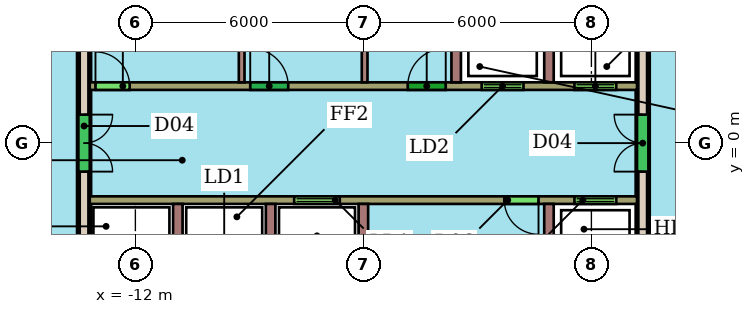
"""IFC4 building model, lengths in metres.
Left out: names, types, materials, properties, quantities, classifications, styles, units other than length and angle.
Written with IfcOpenShell. Run it as: python <this file> out.ifc"""

import sys

from ifc_helpers import new_model, si_unit, direction, frame, frame_2d, origin, place, context, subcontext, project, spatial, rectangle, extrude, element, fill, save


model = new_model("IFC4")
c1 = context("Model", 3, precision=1e-05, world=origin(), true_north=direction((0.0, 1.0)))
c2 = subcontext(c1, "Body", "Model", "MODEL_VIEW")
j1 = project(units=[si_unit("LENGTHUNIT", "METRE"), si_unit("PLANEANGLEUNIT", "RADIAN")], contexts=[c1])
p1 = place(None, origin())
s1 = spatial("IfcSite", under=j1, at=p1, CompositionType="ELEMENT")
p2 = place(p1, origin())
s2 = spatial("IfcBuilding", under=s1, at=p2, CompositionType="ELEMENT")
p3 = place(p2, frame((0.0, 0.0, 286.5)))
s3 = spatial("IfcBuildingStorey", under=s2, at=p3, CompositionType="ELEMENT", Elevation=286.5)
p4 = place(p3, frame((-13.35, 7.3, 0.0), z_axis=(0.0, 0.0, 1.0), x_axis=(0.0, -1.0, 0.0)))
e1 = element("IfcWall", 1, at=p4, inside=s3, PredefinedType="SHEAR", context=c2, shape_type="SweptSolid", body=[
    extrude(rectangle(XDim=14.6, YDim=0.3, at=frame_2d((7.3, 0.0))), origin(), (0.0, 0.0, 1.0), 3.3),
])
p5 = place(p4, frame((6.55, 0.0, 0.0)))
e2 = element("IfcOpeningElement", 2, at=p5, cuts=e1, PredefinedType="OPENING", context=c2, shape_type="SweptSolid", body=[
    extrude(rectangle(XDim=1.5, YDim=2.1, at=frame_2d((0.75, 1.05))), frame((0.0, 0.16, 0.0), z_axis=(0.0, -1.0, 0.0), x_axis=(1.0, 0.0, 0.0)), (0.0, 0.0, 1.0), 0.32),
])
p6 = place(p3, frame((1.35, -7.3, 0.0), z_axis=(0.0, 0.0, 1.0), x_axis=(0.0, 1.0, 0.0)))
e3 = element("IfcWall", 3, at=p6, inside=s3, PredefinedType="SHEAR", context=c2, shape_type="SweptSolid", body=[
    extrude(rectangle(XDim=14.6, YDim=0.3, at=frame_2d((7.3, 0.0))), origin(), (0.0, 0.0, 1.0), 3.3),
])
p7 = place(p6, frame((1.21, 0.0, 0.0)))
e4 = element("IfcOpeningElement", 4, at=p7, cuts=e3, PredefinedType="OPENING", context=c2, shape_type="SweptSolid", body=[
    extrude(rectangle(XDim=1.0, YDim=2.1, at=frame_2d((0.5, 1.05))), frame((0.0, 0.16, 0.0), z_axis=(0.0, -1.0, 0.0), x_axis=(1.0, 0.0, 0.0)), (0.0, 0.0, 1.0), 0.32),
])
p8 = place(p6, frame((6.55, 0.0, 0.0)))
e5 = element("IfcOpeningElement", 5, at=p8, cuts=e3, PredefinedType="OPENING", context=c2, shape_type="SweptSolid", body=[
    extrude(rectangle(XDim=1.5, YDim=2.1, at=frame_2d((0.75, 1.05))), frame((0.0, 0.16, 0.0), z_axis=(0.0, -1.0, 0.0), x_axis=(1.0, 0.0, 0.0)), (0.0, 0.0, 1.0), 0.32),
])
p9 = place(p3, frame((-13.2, 1.5, 0.0), z_axis=(0.0, 0.0, 1.0), x_axis=(1.0, 0.0, 0.0)))
e6 = element("IfcWall", 6, at=p9, inside=s3, PredefinedType="SHEAR", context=c2, shape_type="SweptSolid", body=[
    extrude(rectangle(XDim=14.4, YDim=0.2, at=frame_2d((7.2, 0.0))), origin(), (0.0, 0.0, 1.0), 3.3),
])
p10 = place(p9, frame((10.312, 0.0, 0.0)))
e7 = element("IfcOpeningElement", 7, at=p10, cuts=e6, PredefinedType="OPENING", context=c2, shape_type="SweptSolid", body=[
    extrude(rectangle(XDim=1.1, YDim=2.1, at=frame_2d((0.55, 1.05))), frame((0.0, 0.11, 0.0), z_axis=(0.0, -1.0, 0.0), x_axis=(1.0, 0.0, 0.0)), (0.0, 0.0, 1.0), 0.22),
])
p11 = place(p9, frame((12.754, 0.0, 0.0)))
e8 = element("IfcOpeningElement", 8, at=p11, cuts=e6, PredefinedType="OPENING", context=c2, shape_type="SweptSolid", body=[
    extrude(rectangle(XDim=1.1, YDim=2.1, at=frame_2d((0.55, 1.05))), frame((0.0, 0.11, 0.0), z_axis=(0.0, -1.0, 0.0), x_axis=(1.0, 0.0, 0.0)), (0.0, 0.0, 1.0), 0.22),
])
p12 = place(p9, frame((0.15, 0.0, 0.0)))
e9 = element("IfcOpeningElement", 9, at=p12, cuts=e6, PredefinedType="OPENING", context=c2, shape_type="SweptSolid", body=[
    extrude(rectangle(XDim=0.9, YDim=2.1, at=frame_2d((0.45, 1.05))), frame((0.0, 0.11, 0.0), z_axis=(0.0, -1.0, 0.0), x_axis=(1.0, 0.0, 0.0)), (0.0, 0.0, 1.0), 0.22),
])
p13 = place(p9, frame((4.222, 0.0, 0.0)))
e10 = element("IfcOpeningElement", 10, at=p13, cuts=e6, PredefinedType="OPENING", context=c2, shape_type="SweptSolid", body=[
    extrude(rectangle(XDim=1.0, YDim=2.1, at=frame_2d((0.5, 1.05))), frame((0.0, 0.11, 0.0), z_axis=(0.0, -1.0, 0.0), x_axis=(1.0, 0.0, 0.0)), (0.0, 0.0, 1.0), 0.22),
])
p14 = place(p9, frame((8.367, 0.0, 0.0)))
e11 = element("IfcOpeningElement", 11, at=p14, cuts=e6, PredefinedType="OPENING", context=c2, shape_type="SweptSolid", body=[
    extrude(rectangle(XDim=1.0, YDim=2.1, at=frame_2d((0.5, 1.05))), frame((0.0, 0.11, 0.0), z_axis=(0.0, -1.0, 0.0), x_axis=(1.0, 0.0, 0.0)), (0.0, 0.0, 1.0), 0.22),
])
p15 = place(p3, frame((1.2, -1.5, 0.0), z_axis=(0.0, 0.0, 1.0), x_axis=(-1.0, 0.0, 0.0)))
e12 = element("IfcWall", 12, at=p15, inside=s3, PredefinedType="SHEAR", context=c2, shape_type="SweptSolid", body=[
    extrude(rectangle(XDim=14.4, YDim=0.2, at=frame_2d((7.2, 0.0))), origin(), (0.0, 0.0, 1.0), 3.3),
])
p16 = place(p15, frame((7.821, 0.0, 0.0)))
e13 = element("IfcOpeningElement", 13, at=p16, cuts=e12, PredefinedType="OPENING", context=c2, shape_type="SweptSolid", body=[
    extrude(rectangle(XDim=1.2, YDim=2.1, at=frame_2d((0.6, 1.05))), frame((0.0, 0.11, 0.0), z_axis=(0.0, -1.0, 0.0), x_axis=(1.0, 0.0, 0.0)), (0.0, 0.0, 1.0), 0.22),
])
p17 = place(p15, frame((0.546, 0.0, 0.0)))
e14 = element("IfcOpeningElement", 14, at=p17, cuts=e12, PredefinedType="OPENING", context=c2, shape_type="SweptSolid", body=[
    extrude(rectangle(XDim=1.1, YDim=2.1, at=frame_2d((0.55, 1.05))), frame((0.0, 0.11, 0.0), z_axis=(0.0, -1.0, 0.0), x_axis=(1.0, 0.0, 0.0)), (0.0, 0.0, 1.0), 0.22),
])
p18 = place(p15, frame((2.592, 0.0, 0.0)))
e15 = element("IfcOpeningElement", 15, at=p18, cuts=e12, PredefinedType="OPENING", context=c2, shape_type="SweptSolid", body=[
    extrude(rectangle(XDim=0.9, YDim=2.1, at=frame_2d((0.45, 1.05))), frame((0.0, 0.11, 0.0), z_axis=(0.0, -1.0, 0.0), x_axis=(1.0, 0.0, 0.0)), (0.0, 0.0, 1.0), 0.22),
])
for number, where, z_axis, x_axis in (
    (16, (-3.558, 1.6, 0.0), (0.0, 0.0, 1.0), (0.0, 1.0, 0.0)),
    (17, (-1.117, 1.6, 0.0), (0.0, 0.0, 1.0), (0.0, 1.0, 0.0)),
):
    element("IfcWall", number, at=place(p3, frame(where, z_axis=z_axis, x_axis=x_axis)), inside=s3, PredefinedType="SHEAR", context=c2, shape_type="SweptSolid", body=[
        extrude(rectangle(XDim=1.93, YDim=0.25, at=frame_2d((0.965, 0.0))), origin(), (0.0, 0.0, 1.0), 3.3),
    ])
for number, where, z_axis, x_axis in (
    (18, (-9.203, 1.6, 0.0), (0.0, 0.0, 1.0), (0.0, 1.0, 0.0)),
    (19, (-5.967, 1.6, 0.0), (0.0, 0.0, 1.0), (0.0, 1.0, 0.0)),
):
    element("IfcWall", number, at=place(p3, frame(where, z_axis=z_axis, x_axis=x_axis)), inside=s3, PredefinedType="PARTITIONING", context=c2, shape_type="SweptSolid", body=[
        extrude(rectangle(XDim=1.93, YDim=0.15, at=frame_2d((0.965, 0.0))), origin(), (0.0, 0.0, 1.0), 3.3),
    ])
for number, where, z_axis, x_axis in (
    (20, (-10.883, -1.6, 0.0), (0.0, 0.0, 1.0), (0.0, -1.0, 0.0)),
    (21, (-8.442, -1.6, 0.0), (0.0, 0.0, 1.0), (0.0, -1.0, 0.0)),
    (22, (-6.0, -1.6, 0.0), (0.0, 0.0, 1.0), (0.0, -1.0, 0.0)),
    (23, (-1.117, -1.6, 0.0), (0.0, 0.0, 1.0), (0.0, -1.0, 0.0)),
):
    element("IfcWall", number, at=place(p3, frame(where, z_axis=z_axis, x_axis=x_axis)), inside=s3, PredefinedType="SHEAR", context=c2, shape_type="SweptSolid", body=[
        extrude(rectangle(XDim=1.93, YDim=0.25, at=frame_2d((0.965, 0.0))), origin(), (0.0, 0.0, 1.0), 3.3),
    ])
p19 = place(p5, origin())
e24 = element("IfcDoor", 24, at=p19, inside=s3, OperationType="DOUBLE_DOOR_SINGLE_SWING", PredefinedType="NOTDEFINED", context=c2, shape_type="SweptSolid", body=[
    extrude(rectangle(XDim=1.5, YDim=2.1, at=frame_2d((0.75, 1.05))), frame((0.0, 0.025, 0.0), z_axis=(0.0, -1.0, 0.0), x_axis=(1.0, 0.0, 0.0)), (0.0, 0.0, 1.0), 0.05),
])
fill(e2, e24)
p20 = place(p8, origin())
e25 = element("IfcDoor", 25, at=p20, inside=s3, OperationType="DOUBLE_DOOR_SINGLE_SWING", PredefinedType="NOTDEFINED", context=c2, shape_type="SweptSolid", body=[
    extrude(rectangle(XDim=1.5, YDim=2.1, at=frame_2d((0.75, 1.05))), frame((0.0, 0.025, 0.0), z_axis=(0.0, -1.0, 0.0), x_axis=(1.0, 0.0, 0.0)), (0.0, 0.0, 1.0), 0.05),
])
fill(e5, e25)
p21 = place(p10, origin())
e26 = element("IfcDoor", 26, at=p21, inside=s3, OperationType="DOUBLE_DOOR_SLIDING", PredefinedType="NOTDEFINED", context=c2, shape_type="SweptSolid", body=[
    extrude(rectangle(XDim=1.1, YDim=2.1, at=frame_2d((0.55, 1.05))), frame((0.0, 0.025, 0.0), z_axis=(0.0, -1.0, 0.0), x_axis=(1.0, 0.0, 0.0)), (0.0, 0.0, 1.0), 0.05),
])
fill(e7, e26)
p22 = place(p11, origin())
e27 = element("IfcDoor", 27, at=p22, inside=s3, OperationType="DOUBLE_DOOR_SLIDING", PredefinedType="NOTDEFINED", context=c2, shape_type="SweptSolid", body=[
    extrude(rectangle(XDim=1.1, YDim=2.1, at=frame_2d((0.55, 1.05))), frame((0.0, 0.025, 0.0), z_axis=(0.0, -1.0, 0.0), x_axis=(1.0, 0.0, 0.0)), (0.0, 0.0, 1.0), 0.05),
])
fill(e8, e27)
p23 = place(p12, origin())
e28 = element("IfcDoor", 28, at=p23, inside=s3, OperationType="SINGLE_SWING_LEFT", PredefinedType="NOTDEFINED", context=c2, shape_type="SweptSolid", body=[
    extrude(rectangle(XDim=0.9, YDim=2.1, at=frame_2d((0.45, 1.05))), frame((0.0, 0.025, 0.0), z_axis=(0.0, -1.0, 0.0), x_axis=(1.0, 0.0, 0.0)), (0.0, 0.0, 1.0), 0.05),
])
fill(e9, e28)
p24 = place(p13, origin())
e29 = element("IfcDoor", 29, at=p24, inside=s3, OperationType="SINGLE_SWING_LEFT", PredefinedType="NOTDEFINED", context=c2, shape_type="SweptSolid", body=[
    extrude(rectangle(XDim=1.0, YDim=2.1, at=frame_2d((0.5, 1.05))), frame((0.0, 0.025, 0.0), z_axis=(0.0, -1.0, 0.0), x_axis=(1.0, 0.0, 0.0)), (0.0, 0.0, 1.0), 0.05),
])
fill(e10, e29)
p25 = place(p14, origin())
e30 = element("IfcDoor", 30, at=p25, inside=s3, OperationType="SINGLE_SWING_RIGHT", PredefinedType="NOTDEFINED", context=c2, shape_type="SweptSolid", body=[
    extrude(rectangle(XDim=1.0, YDim=2.1, at=frame_2d((0.5, 1.05))), frame((0.0, 0.025, 0.0), z_axis=(0.0, -1.0, 0.0), x_axis=(1.0, 0.0, 0.0)), (0.0, 0.0, 1.0), 0.05),
])
fill(e11, e30)
p26 = place(p16, origin())
e31 = element("IfcDoor", 31, at=p26, inside=s3, OperationType="DOUBLE_DOOR_SLIDING", PredefinedType="NOTDEFINED", context=c2, shape_type="SweptSolid", body=[
    extrude(rectangle(XDim=1.2, YDim=2.1, at=frame_2d((0.6, 1.05))), frame((0.0, 0.025, 0.0), z_axis=(0.0, -1.0, 0.0), x_axis=(1.0, 0.0, 0.0)), (0.0, 0.0, 1.0), 0.05),
])
fill(e13, e31)
p27 = place(p17, origin())
e32 = element("IfcDoor", 32, at=p27, inside=s3, OperationType="DOUBLE_DOOR_SLIDING", PredefinedType="NOTDEFINED", context=c2, shape_type="SweptSolid", body=[
    extrude(rectangle(XDim=1.1, YDim=2.1, at=frame_2d((0.55, 1.05))), frame((0.0, 0.025, 0.0), z_axis=(0.0, -1.0, 0.0), x_axis=(1.0, 0.0, 0.0)), (0.0, 0.0, 1.0), 0.05),
])
fill(e14, e32)
p28 = place(p18, origin())
e33 = element("IfcDoor", 33, at=p28, inside=s3, OperationType="SINGLE_SWING_LEFT", PredefinedType="NOTDEFINED", context=c2, shape_type="SweptSolid", body=[
    extrude(rectangle(XDim=0.9, YDim=2.1, at=frame_2d((0.45, 1.05))), frame((0.0, 0.025, 0.0), z_axis=(0.0, -1.0, 0.0), x_axis=(1.0, 0.0, 0.0)), (0.0, 0.0, 1.0), 0.05),
])
fill(e15, e33)
save(model, sys.argv[1])
